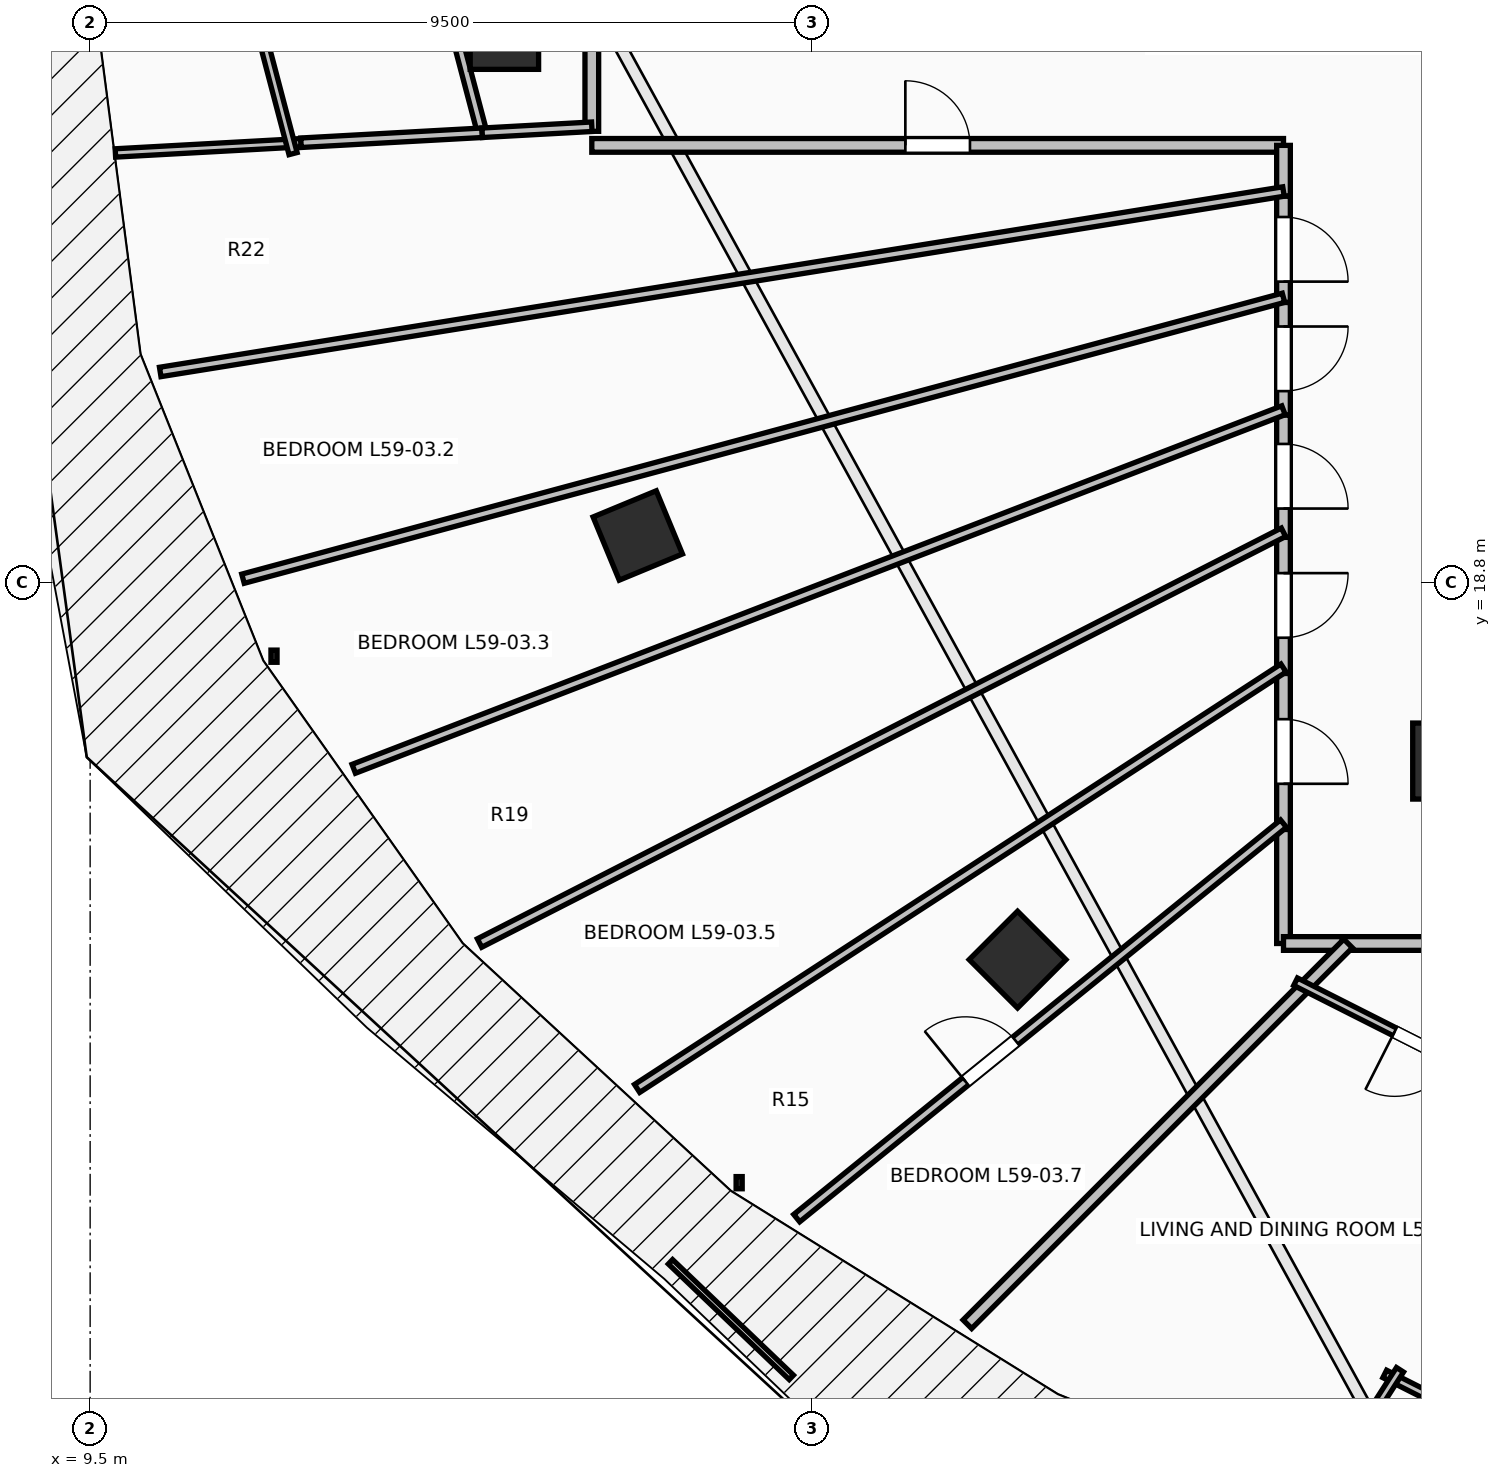
"""IFC4 building model, lengths in metres.
Left out: names, types, materials, properties, quantities, classifications, styles, units other than length and angle.
Written with IfcOpenShell. Run it as: python <this file> out.ifc"""

import sys

from ifc_helpers import new_model, si_unit, direction, frame, frame_2d, origin, origin_2d, place, context, subcontext, project, spatial, rectangle, extrude, element, fill, save


model = new_model("IFC4")
c1 = context("Model", 3, precision=1e-05, world=origin(), true_north=direction((0.0, 1.0)))
c2 = subcontext(c1, "Body", "Model", "MODEL_VIEW")
j1 = project(units=[si_unit("LENGTHUNIT", "METRE"), si_unit("PLANEANGLEUNIT", "RADIAN")], contexts=[c1])
p1 = place(None, origin())
s1 = spatial("IfcSite", under=j1, at=p1, CompositionType="ELEMENT")
p2 = place(p1, origin())
s2 = spatial("IfcBuilding", under=s1, at=p2, CompositionType="ELEMENT")
p3 = place(p2, frame((0.0, 0.0, 217.85)))
s3 = spatial("IfcBuildingStorey", under=s2, at=p3, CompositionType="ELEMENT", Elevation=217.85)
for number, where, z_axis, x_axis in (
    (1, (14.95, 26.0, 0.0), (0.0, 0.0, 1.0), (-1.0, 0.0, 0.0)),
    (2, (16.705, 19.418, 0.0), (0.0, 0.0, 1.0), (-0.924, -0.383, 0.0)),
    (3, (21.701, 13.838, 0.0), (0.0, 0.0, 1.0), (-0.707, -0.707, 0.0)),
):
    element("IfcColumn", number, at=place(p3, frame(where, z_axis=z_axis, x_axis=x_axis)), inside=s3, PredefinedType="COLUMN", context=c2, shape_type="SweptSolid", body=[
        extrude(rectangle(XDim=0.9, YDim=0.9, at=origin_2d()), origin(), (0.0, 0.0, 1.0), 3.55),
    ])
p4 = place(p3, frame((27.25, 16.45, 0.0), z_axis=(0.0, 0.0, 1.0), x_axis=(1.0, 0.0, 0.0)))
e4 = element("IfcColumn", 4, at=p4, inside=s3, PredefinedType="PILASTER", context=c2, shape_type="SweptSolid", body=[
    extrude(rectangle(XDim=0.7, YDim=1.0, at=origin_2d()), origin(), (0.0, 0.0, 1.0), 3.55),
])
p5 = place(p3, frame((16.1, 27.25, 0.0), z_axis=(0.0, 0.0, 1.0), x_axis=(0.0, -1.0, 0.0)))
e5 = element("IfcWall", 5, at=p5, inside=s3, PredefinedType="PARTITIONING", context=c2, shape_type="SweptSolid", body=[
    extrude(rectangle(XDim=2.515, YDim=0.18, at=frame_2d((1.257, 0.0))), origin(), (0.0, 0.0, 1.0), 2.482),
])
p6 = place(p3, frame((16.1, 24.55, 0.0), z_axis=(0.0, 0.0, 1.0), x_axis=(1.0, 0.0, 0.0)))
e6 = element("IfcWall", 6, at=p6, inside=s3, PredefinedType="PARTITIONING", context=c2, shape_type="SweptSolid", body=[
    extrude(rectangle(XDim=9.1, YDim=0.18, at=frame_2d((4.55, 0.0))), origin(), (0.0, 0.0, 1.0), 2.924),
])
p7 = place(p6, frame((4.125, 0.0, 0.0)))
e7 = element("IfcOpeningElement", 7, at=p7, cuts=e6, PredefinedType="OPENING", context=c2, shape_type="SweptSolid", body=[
    extrude(rectangle(XDim=0.85, YDim=2.1, at=frame_2d((0.425, 1.05))), frame((0.0, 0.105, 0.0), z_axis=(0.0, -1.0, 0.0), x_axis=(1.0, 0.0, 0.0)), (0.0, 0.0, 1.0), 0.21),
])
p8 = place(p3, frame((25.2, 24.55, 0.0), z_axis=(0.0, 0.0, 1.0), x_axis=(0.0, -1.0, 0.0)))
e8 = element("IfcWall", 8, at=p8, inside=s3, PredefinedType="PARTITIONING", context=c2, shape_type="SweptSolid", body=[
    extrude(rectangle(XDim=0.668, YDim=0.18, at=frame_2d((0.334, 0.0))), origin(), (0.0, 0.0, 1.0), 3.29),
])
p9 = place(p3, frame((25.2, 23.882, 0.0), z_axis=(0.0, 0.0, 1.0), x_axis=(0.0, -1.0, 0.0)))
e9 = element("IfcWall", 9, at=p9, inside=s3, PredefinedType="PARTITIONING", context=c2, shape_type="SweptSolid", body=[
    extrude(rectangle(XDim=1.399, YDim=0.18, at=frame_2d((0.7, 0.0))), origin(), (0.0, 0.0, 1.0), 3.29),
])
p10 = place(p9, frame((0.274, 0.0, 0.0)))
e10 = element("IfcOpeningElement", 10, at=p10, cuts=e9, PredefinedType="OPENING", context=c2, shape_type="SweptSolid", body=[
    extrude(rectangle(XDim=0.85, YDim=2.1, at=frame_2d((0.425, 1.05))), frame((0.0, 0.105, 0.0), z_axis=(0.0, -1.0, 0.0), x_axis=(1.0, 0.0, 0.0)), (0.0, 0.0, 1.0), 0.21),
])
p11 = place(p3, frame((25.2, 22.483, 0.0), z_axis=(0.0, 0.0, 1.0), x_axis=(0.0, -1.0, 0.0)))
e11 = element("IfcWall", 11, at=p11, inside=s3, PredefinedType="PARTITIONING", context=c2, shape_type="SweptSolid", body=[
    extrude(rectangle(XDim=1.482, YDim=0.18, at=frame_2d((0.741, 0.0))), origin(), (0.0, 0.0, 1.0), 3.29),
])
p12 = place(p11, frame((0.316, 0.0, 0.0)))
e12 = element("IfcOpeningElement", 12, at=p12, cuts=e11, PredefinedType="OPENING", context=c2, shape_type="SweptSolid", body=[
    extrude(rectangle(XDim=0.85, YDim=2.1, at=frame_2d((0.425, 1.05))), frame((0.0, 0.105, 0.0), z_axis=(0.0, -1.0, 0.0), x_axis=(1.0, 0.0, 0.0)), (0.0, 0.0, 1.0), 0.21),
])
p13 = place(p3, frame((25.2, 21.001, 0.0), z_axis=(0.0, 0.0, 1.0), x_axis=(0.0, -1.0, 0.0)))
e13 = element("IfcWall", 13, at=p13, inside=s3, PredefinedType="PARTITIONING", context=c2, shape_type="SweptSolid", body=[
    extrude(rectangle(XDim=1.608, YDim=0.18, at=frame_2d((0.804, 0.0))), origin(), (0.0, 0.0, 1.0), 3.29),
])
p14 = place(p13, frame((0.379, 0.0, 0.0)))
e14 = element("IfcOpeningElement", 14, at=p14, cuts=e13, PredefinedType="OPENING", context=c2, shape_type="SweptSolid", body=[
    extrude(rectangle(XDim=0.85, YDim=2.1, at=frame_2d((0.425, 1.05))), frame((0.0, 0.105, 0.0), z_axis=(0.0, -1.0, 0.0), x_axis=(1.0, 0.0, 0.0)), (0.0, 0.0, 1.0), 0.21),
])
p15 = place(p3, frame((25.2, 19.393, 0.0), z_axis=(0.0, 0.0, 1.0), x_axis=(0.0, -1.0, 0.0)))
e15 = element("IfcWall", 15, at=p15, inside=s3, PredefinedType="PARTITIONING", context=c2, shape_type="SweptSolid", body=[
    extrude(rectangle(XDim=1.791, YDim=0.18, at=frame_2d((0.896, 0.0))), origin(), (0.0, 0.0, 1.0), 3.29),
])
p16 = place(p15, frame((0.47, 0.0, 0.0)))
e16 = element("IfcOpeningElement", 16, at=p16, cuts=e15, PredefinedType="OPENING", context=c2, shape_type="SweptSolid", body=[
    extrude(rectangle(XDim=0.85, YDim=2.1, at=frame_2d((0.425, 1.05))), frame((0.0, 0.105, 0.0), z_axis=(0.0, -1.0, 0.0), x_axis=(1.0, 0.0, 0.0)), (0.0, 0.0, 1.0), 0.21),
])
p17 = place(p3, frame((25.2, 17.602, 0.0), z_axis=(0.0, 0.0, 1.0), x_axis=(0.0, -1.0, 0.0)))
e17 = element("IfcWall", 17, at=p17, inside=s3, PredefinedType="PARTITIONING", context=c2, shape_type="SweptSolid", body=[
    extrude(rectangle(XDim=2.052, YDim=0.18, at=frame_2d((1.026, 0.0))), origin(), (0.0, 0.0, 1.0), 2.482),
])
p18 = place(p17, frame((0.601, 0.0, 0.0)))
e18 = element("IfcOpeningElement", 18, at=p18, cuts=e17, PredefinedType="OPENING", context=c2, shape_type="SweptSolid", body=[
    extrude(rectangle(XDim=0.85, YDim=2.1, at=frame_2d((0.425, 1.05))), frame((0.0, 0.105, 0.0), z_axis=(0.0, -1.0, 0.0), x_axis=(1.0, 0.0, 0.0)), (0.0, 0.0, 1.0), 0.21),
])
p19 = place(p3, frame((25.2, 15.55, 0.0), z_axis=(0.0, 0.0, 1.0), x_axis=(0.0, -1.0, 0.0)))
e19 = element("IfcWall", 19, at=p19, inside=s3, PredefinedType="PARTITIONING", context=c2, shape_type="SweptSolid", body=[
    extrude(rectangle(XDim=1.5, YDim=0.18, at=frame_2d((0.75, 0.0))), origin(), (0.0, 0.0, 1.0), 2.482),
])
p20 = place(p3, frame((25.2, 14.05, 0.0), z_axis=(0.0, 0.0, 1.0), x_axis=(1.0, 0.0, 0.0)))
e20 = element("IfcWall", 20, at=p20, inside=s3, PredefinedType="PARTITIONING", context=c2, shape_type="SweptSolid", body=[
    extrude(rectangle(XDim=0.91, YDim=0.18, at=frame_2d((0.455, 0.0))), origin(), (0.0, 0.0, 1.0), 2.979),
])
p21 = place(p3, frame((25.97, 14.05, 0.0), z_axis=(0.0, 0.0, 1.0), x_axis=(1.0, 0.0, 0.0)))
e21 = element("IfcWall", 21, at=p21, inside=s3, PredefinedType="PARTITIONING", context=c2, shape_type="SweptSolid", body=[
    extrude(rectangle(XDim=4.124, YDim=0.18, at=frame_2d((2.062, 0.0))), origin(), (0.0, 0.0, 1.0), 2.482),
])
p22 = place(p3, frame((12.274, 24.585, 0.0), z_axis=(0.0, 0.0, 1.0), x_axis=(-0.998485442787, -0.055016547898, 0.0)))
e22 = element("IfcWall", 22, at=p22, inside=s3, PredefinedType="PARTITIONING", context=c2, shape_type="SweptSolid", body=[
    extrude(rectangle(XDim=2.445, YDim=0.11, at=frame_2d((1.223, 0.0))), origin(), (0.0, 0.0, 1.0), 3.29),
])
p23 = place(p3, frame((14.32, 26.0, 0.0), z_axis=(0.0, 0.0, 1.0), x_axis=(0.254502350799, -0.967072155239, 0.0)))
e23 = element("IfcWall", 23, at=p23, inside=s3, PredefinedType="PARTITIONING", context=c2, shape_type="SweptSolid", body=[
    extrude(rectangle(XDim=1.328, YDim=0.125, at=frame_2d((0.664, 0.0))), origin(), (0.0, 0.0, 1.0), 3.29),
])
p24 = place(p3, frame((14.658, 24.716, 0.0), z_axis=(0.0, 0.0, 1.0), x_axis=(-0.998486041439, -0.055005681988, 0.0)))
e24 = element("IfcWall", 24, at=p24, inside=s3, PredefinedType="PARTITIONING", context=c2, shape_type="SweptSolid", body=[
    extrude(rectangle(XDim=2.388, YDim=0.125, at=frame_2d((1.194, 0.0))), origin(), (0.0, 0.0, 1.0), 3.29),
])
p25 = place(p3, frame((14.658, 24.716, 0.0), z_axis=(0.0, 0.0, 1.0), x_axis=(0.99849911476, 0.054767853933, 0.0)))
e25 = element("IfcWall", 25, at=p25, inside=s3, PredefinedType="PARTITIONING", context=c2, shape_type="SweptSolid", body=[
    extrude(rectangle(XDim=1.444, YDim=0.125, at=frame_2d((0.722, 0.0))), origin(), (0.0, 0.0, 1.0), 2.824),
])
p26 = place(p3, frame((12.17, 24.442, 0.0), z_axis=(0.0, 0.0, 1.0), x_axis=(-0.254260000639, 0.967135901554, 0.0)))
e26 = element("IfcWall", 26, at=p26, inside=s3, PredefinedType="PARTITIONING", context=c2, shape_type="SweptSolid", body=[
    extrude(rectangle(XDim=1.751, YDim=0.11, at=frame_2d((0.876, 0.0))), origin(), (0.0, 0.0, 1.0), 3.29),
])
p27 = place(p3, frame((10.422, 21.569, 0.0), z_axis=(0.0, 0.0, 1.0), x_axis=(0.987340682458, 0.158613923612, 0.0)))
e27 = element("IfcWall", 27, at=p27, inside=s3, PredefinedType="PARTITIONING", context=c2, shape_type="SweptSolid", body=[
    extrude(rectangle(XDim=14.967, YDim=0.125, at=frame_2d((7.484, 0.0))), origin(), (0.0, 0.0, 1.0), 2.824),
])
p28 = place(p3, frame((11.511, 18.849, 0.0), z_axis=(0.0, 0.0, 1.0), x_axis=(0.965432982217, 0.260651408682, 0.0)))
e28 = element("IfcWall", 28, at=p28, inside=s3, PredefinedType="PARTITIONING", context=c2, shape_type="SweptSolid", body=[
    extrude(rectangle(XDim=14.179, YDim=0.125, at=frame_2d((7.09, 0.0))), origin(), (0.0, 0.0, 1.0), 2.824),
])
p29 = place(p3, frame((12.968, 16.348, 0.0), z_axis=(0.0, 0.0, 1.0), x_axis=(0.933027024267, 0.35980629787, 0.0)))
e29 = element("IfcWall", 29, at=p29, inside=s3, PredefinedType="PARTITIONING", context=c2, shape_type="SweptSolid", body=[
    extrude(rectangle(XDim=13.11, YDim=0.125, at=frame_2d((6.555, 0.0))), origin(), (0.0, 0.0, 1.0), 2.482),
])
p30 = place(p3, frame((14.623, 14.056, 0.0), z_axis=(0.0, 0.0, 1.0), x_axis=(0.890500200784, 0.454982848472, 0.0)))
e30 = element("IfcWall", 30, at=p30, inside=s3, PredefinedType="PARTITIONING", context=c2, shape_type="SweptSolid", body=[
    extrude(rectangle(XDim=11.877, YDim=0.125, at=frame_2d((5.939, 0.0))), origin(), (0.0, 0.0, 1.0), 2.482),
])
p31 = place(p3, frame((16.696, 12.143, 0.0), z_axis=(0.0, 0.0, 1.0), x_axis=(0.83828742398, 0.545228571149, 0.0)))
e31 = element("IfcWall", 31, at=p31, inside=s3, PredefinedType="PARTITIONING", context=c2, shape_type="SweptSolid", body=[
    extrude(rectangle(XDim=10.144, YDim=0.125, at=frame_2d((5.072, 0.0))), origin(), (0.0, 0.0, 1.0), 2.482),
])
p32 = place(p3, frame((18.796, 10.437, 0.0), z_axis=(0.0, 0.0, 1.0), x_axis=(0.776906100203, 0.629616479666, 0.0)))
e32 = element("IfcWall", 32, at=p32, inside=s3, PredefinedType="PARTITIONING", context=c2, shape_type="SweptSolid", body=[
    extrude(rectangle(XDim=8.243, YDim=0.125, at=frame_2d((4.122, 0.0))), origin(), (0.0, 0.0, 1.0), 2.482),
])
p33 = place(p32, frame((2.856, 0.0, 0.0)))
e33 = element("IfcOpeningElement", 33, at=p33, cuts=e32, PredefinedType="OPENING", context=c2, shape_type="SweptSolid", body=[
    extrude(rectangle(XDim=0.85, YDim=2.1, at=frame_2d((0.425, 1.05))), frame((0.0, 0.077, 0.0), z_axis=(0.0, -1.0, 0.0), x_axis=(1.0, 0.0, 0.0)), (0.0, 0.0, 1.0), 0.155),
])
p34 = place(p3, frame((21.041, 9.041, 0.0), z_axis=(0.0, 0.0, 1.0), x_axis=(0.707106781187, 0.707106781187, 0.0)))
e34 = element("IfcWall", 34, at=p34, inside=s3, PredefinedType="PARTITIONING", context=c2, shape_type="SweptSolid", body=[
    extrude(rectangle(XDim=7.084, YDim=0.16, at=frame_2d((3.542, 0.0))), origin(), (0.0, 0.0, 1.0), 2.824),
])
p35 = place(p3, frame((28.723, 11.847, 0.0), z_axis=(0.0, 0.0, 1.0), x_axis=(-0.892449406128, 0.451147489743, 0.0)))
e35 = element("IfcWall", 35, at=p35, inside=s3, PredefinedType="PARTITIONING", context=c2, shape_type="SweptSolid", body=[
    extrude(rectangle(XDim=3.769, YDim=0.11, at=frame_2d((1.885, 0.0))), origin(), (0.0, 0.0, 1.0), 2.482),
])
p36 = place(p35, frame((1.46, 0.0, 0.0)))
e36 = element("IfcOpeningElement", 36, at=p36, cuts=e35, PredefinedType="OPENING", context=c2, shape_type="SweptSolid", body=[
    extrude(rectangle(XDim=0.85, YDim=2.1, at=frame_2d((0.425, 1.05))), frame((0.0, 0.07, 0.0), z_axis=(0.0, -1.0, 0.0), x_axis=(1.0, 0.0, 0.0)), (0.0, 0.0, 1.0), 0.14),
])
p37 = place(p3, frame((26.532, 8.387, 0.0), z_axis=(0.0, 0.0, 1.0), x_axis=(0.892649776719, -0.450750902521, 0.0)))
e37 = element("IfcWall", 37, at=p37, inside=s3, PredefinedType="PARTITIONING", context=c2, shape_type="SweptSolid", body=[
    extrude(rectangle(XDim=1.738, YDim=0.11, at=frame_2d((0.869, 0.0))), origin(), (0.0, 0.0, 1.0), 3.29),
])
p38 = place(p3, frame((25.649, 6.753, 0.0), z_axis=(0.0, 0.0, 1.0), x_axis=(0.539927041948, 0.841711820859, 0.0)))
e38 = element("IfcWall", 38, at=p38, inside=s3, PredefinedType="PARTITIONING", context=c2, shape_type="SweptSolid", body=[
    extrude(rectangle(XDim=2.006, YDim=0.11, at=frame_2d((1.003, 0.0))), origin(), (0.0, 0.0, 1.0), 3.29),
])
p39 = place(p36, origin())
e39 = element("IfcDoor", 39, at=p39, inside=s3, OperationType="SINGLE_SWING_RIGHT", PredefinedType="DOOR", context=c2, shape_type="SweptSolid", body=[
    extrude(rectangle(XDim=0.85, YDim=2.1, at=frame_2d((0.425, 1.05))), frame((0.0, 0.025, 0.0), z_axis=(0.0, -1.0, 0.0), x_axis=(1.0, 0.0, 0.0)), (0.0, 0.0, 1.0), 0.05),
])
fill(e36, e39)
p40 = place(p7, origin())
e40 = element("IfcDoor", 40, at=p40, inside=s3, OperationType="SINGLE_SWING_LEFT", PredefinedType="DOOR", context=c2, shape_type="SweptSolid", body=[
    extrude(rectangle(XDim=0.85, YDim=2.1, at=frame_2d((0.425, 1.05))), frame((0.0, 0.025, 0.0), z_axis=(0.0, -1.0, 0.0), x_axis=(1.0, 0.0, 0.0)), (0.0, 0.0, 1.0), 0.05),
])
fill(e7, e40)
p41 = place(p10, origin())
e41 = element("IfcDoor", 41, at=p41, inside=s3, OperationType="SINGLE_SWING_RIGHT", PredefinedType="DOOR", context=c2, shape_type="SweptSolid", body=[
    extrude(rectangle(XDim=0.85, YDim=2.1, at=frame_2d((0.425, 1.05))), frame((0.0, 0.025, 0.0), z_axis=(0.0, -1.0, 0.0), x_axis=(1.0, 0.0, 0.0)), (0.0, 0.0, 1.0), 0.05),
])
fill(e10, e41)
p42 = place(p12, origin())
e42 = element("IfcDoor", 42, at=p42, inside=s3, OperationType="SINGLE_SWING_LEFT", PredefinedType="DOOR", context=c2, shape_type="SweptSolid", body=[
    extrude(rectangle(XDim=0.85, YDim=2.1, at=frame_2d((0.425, 1.05))), frame((0.0, 0.025, 0.0), z_axis=(0.0, -1.0, 0.0), x_axis=(1.0, 0.0, 0.0)), (0.0, 0.0, 1.0), 0.05),
])
fill(e12, e42)
p43 = place(p14, origin())
e43 = element("IfcDoor", 43, at=p43, inside=s3, OperationType="SINGLE_SWING_RIGHT", PredefinedType="DOOR", context=c2, shape_type="SweptSolid", body=[
    extrude(rectangle(XDim=0.85, YDim=2.1, at=frame_2d((0.425, 1.05))), frame((0.0, 0.025, 0.0), z_axis=(0.0, -1.0, 0.0), x_axis=(1.0, 0.0, 0.0)), (0.0, 0.0, 1.0), 0.05),
])
fill(e14, e43)
p44 = place(p16, origin())
e44 = element("IfcDoor", 44, at=p44, inside=s3, OperationType="SINGLE_SWING_LEFT", PredefinedType="DOOR", context=c2, shape_type="SweptSolid", body=[
    extrude(rectangle(XDim=0.85, YDim=2.1, at=frame_2d((0.425, 1.05))), frame((0.0, 0.025, 0.0), z_axis=(0.0, -1.0, 0.0), x_axis=(1.0, 0.0, 0.0)), (0.0, 0.0, 1.0), 0.05),
])
fill(e16, e44)
p45 = place(p18, origin())
e45 = element("IfcDoor", 45, at=p45, inside=s3, OperationType="SINGLE_SWING_RIGHT", PredefinedType="DOOR", context=c2, shape_type="SweptSolid", body=[
    extrude(rectangle(XDim=0.85, YDim=2.1, at=frame_2d((0.425, 1.05))), frame((0.0, 0.025, 0.0), z_axis=(0.0, -1.0, 0.0), x_axis=(1.0, 0.0, 0.0)), (0.0, 0.0, 1.0), 0.05),
])
fill(e18, e45)
p46 = place(p33, origin())
e46 = element("IfcDoor", 46, at=p46, inside=s3, OperationType="SINGLE_SWING_LEFT", PredefinedType="DOOR", context=c2, shape_type="SweptSolid", body=[
    extrude(rectangle(XDim=0.85, YDim=2.1, at=frame_2d((0.425, 1.05))), frame((0.0, 0.025, 0.0), z_axis=(0.0, -1.0, 0.0), x_axis=(1.0, 0.0, 0.0)), (0.0, 0.0, 1.0), 0.05),
])
fill(e33, e46)
save(model, sys.argv[1])
